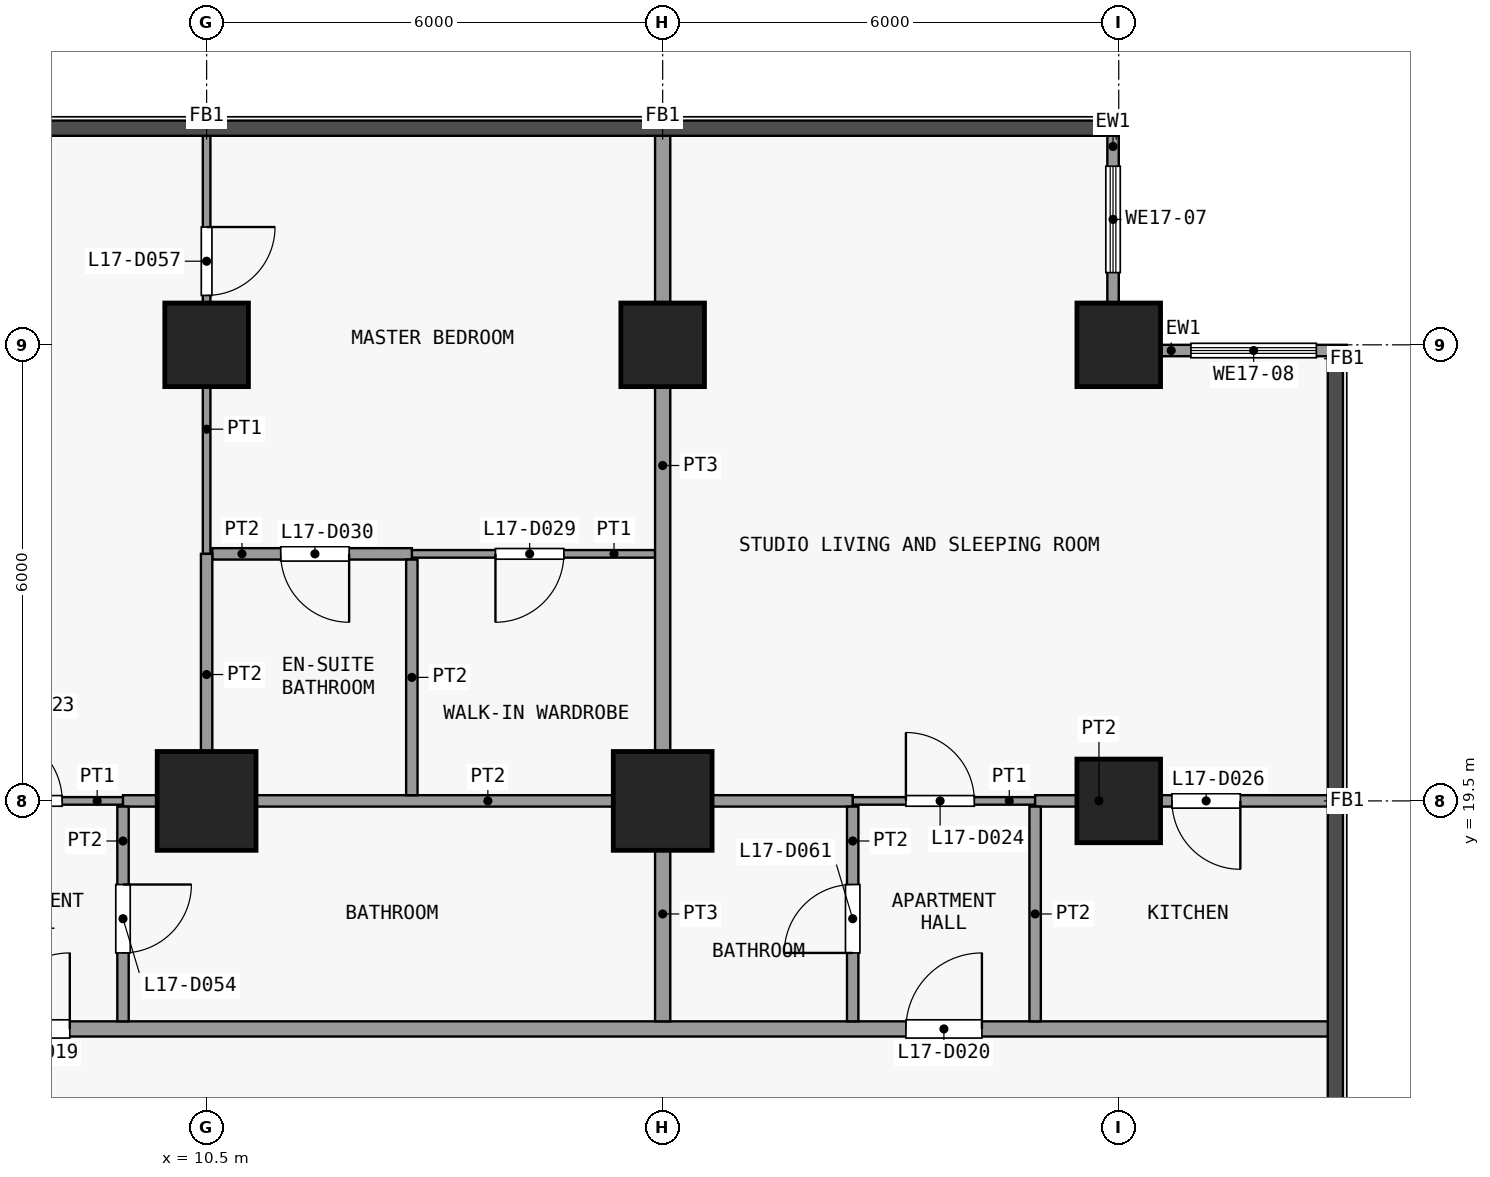
"""IFC4 building model, lengths in metres.
Left out: names, types, materials, properties, quantities, classifications, styles, units other than length and angle.
Written with IfcOpenShell. Run it as: python <this file> out.ifc"""

import sys

from ifc_helpers import new_model, si_unit, direction, frame, frame_2d, origin, origin_2d, place, context, subcontext, project, spatial, rectangle, extrude, element, fill, save


model = new_model("IFC4")
c1 = context("Model", 3, precision=1e-05, world=origin(), true_north=direction((0.0, 1.0)))
c2 = subcontext(c1, "Body", "Model", "MODEL_VIEW")
j1 = project(units=[si_unit("LENGTHUNIT", "METRE"), si_unit("PLANEANGLEUNIT", "RADIAN")], contexts=[c1])
p1 = place(None, origin())
s1 = spatial("IfcSite", under=j1, at=p1, CompositionType="ELEMENT")
p2 = place(p1, origin())
s2 = spatial("IfcBuilding", under=s1, at=p2, CompositionType="ELEMENT")
p3 = place(p2, frame((0.0, 0.0, 72.1)))
s3 = spatial("IfcBuildingStorey", under=s2, at=p3, CompositionType="ELEMENT", Elevation=72.1)
p4 = place(p3, frame((10.5, 19.5, 0.0), z_axis=(0.0, 0.0, 1.0), x_axis=(1.0, 0.0, 0.0)))
e1 = element("IfcColumn", 1, at=p4, inside=s3, PredefinedType="COLUMN", context=c2, shape_type="SweptSolid", body=[
    extrude(rectangle(XDim=1.3, YDim=1.3, at=origin_2d()), origin(), (0.0, 0.0, 1.0), 3.6),
])
p5 = place(p3, frame((10.5, 25.5, 0.0), z_axis=(0.0, 0.0, 1.0), x_axis=(1.0, 0.0, 0.0)))
e2 = element("IfcColumn", 2, at=p5, inside=s3, PredefinedType="COLUMN", context=c2, shape_type="SweptSolid", body=[
    extrude(rectangle(XDim=1.1, YDim=1.1, at=origin_2d()), origin(), (0.0, 0.0, 1.0), 3.6),
])
p6 = place(p3, frame((16.5, 19.5, 0.0), z_axis=(0.0, 0.0, 1.0), x_axis=(1.0, 0.0, 0.0)))
e3 = element("IfcColumn", 3, at=p6, inside=s3, PredefinedType="COLUMN", context=c2, shape_type="SweptSolid", body=[
    extrude(rectangle(XDim=1.3, YDim=1.3, at=origin_2d()), origin(), (0.0, 0.0, 1.0), 3.6),
])
for number, where, z_axis, x_axis in (
    (4, (16.5, 25.5, 0.0), (0.0, 0.0, 1.0), (1.0, 0.0, 0.0)),
    (5, (22.5, 19.5, 0.0), (0.0, 0.0, 1.0), (1.0, 0.0, 0.0)),
    (6, (22.5, 25.5, 0.0), (0.0, 0.0, 1.0), (1.0, 0.0, 0.0)),
):
    element("IfcColumn", number, at=place(p3, frame(where, z_axis=z_axis, x_axis=x_axis)), inside=s3, PredefinedType="COLUMN", context=c2, shape_type="SweptSolid", body=[
        extrude(rectangle(XDim=1.1, YDim=1.1, at=origin_2d()), origin(), (0.0, 0.0, 1.0), 3.6),
    ])
p7 = place(p3, frame((22.425, 28.25, 0.0), z_axis=(0.0, 0.0, 1.0), x_axis=(0.0, -1.0, 0.0)))
e7 = element("IfcWall", 7, at=p7, inside=s3, PredefinedType="SOLIDWALL", context=c2, shape_type="SweptSolid", body=[
    extrude(rectangle(XDim=2.2, YDim=0.15, at=frame_2d((1.1, 0.0))), origin(), (0.0, 0.0, 1.0), 3.15),
])
p8 = place(p7, frame((0.4, 0.0, 0.9)))
e8 = element("IfcOpeningElement", 8, at=p8, cuts=e7, PredefinedType="OPENING", context=c2, shape_type="SweptSolid", body=[
    extrude(rectangle(XDim=1.4, YDim=2.4, at=frame_2d((0.7, 1.2))), frame((0.0, 0.085, 0.0), z_axis=(0.0, -1.0, 0.0), x_axis=(1.0, 0.0, 0.0)), (0.0, 0.0, 1.0), 0.17),
])
p9 = place(p3, frame((23.05, 25.425, 0.0), z_axis=(0.0, 0.0, 1.0), x_axis=(1.0, 0.0, 0.0)))
e9 = element("IfcWall", 9, at=p9, inside=s3, PredefinedType="SOLIDWALL", context=c2, shape_type="SweptSolid", body=[
    extrude(rectangle(XDim=2.45, YDim=0.15, at=frame_2d((1.225, 0.0))), origin(), (0.0, 0.0, 1.0), 3.15),
])
p10 = place(p9, frame((0.4, 0.0, 0.9)))
e10 = element("IfcOpeningElement", 10, at=p10, cuts=e9, PredefinedType="OPENING", context=c2, shape_type="SweptSolid", body=[
    extrude(rectangle(XDim=1.65, YDim=2.4, at=frame_2d((0.825, 1.2))), frame((0.0, 0.085, 0.0), z_axis=(0.0, -1.0, 0.0), x_axis=(1.0, 0.0, 0.0)), (0.0, 0.0, 1.0), 0.17),
])
p11 = place(p3, frame((-25.35, 16.5, 0.0), z_axis=(0.0, 0.0, 1.0), x_axis=(1.0, 0.0, 0.0)))
e11 = element("IfcWall", 11, at=p11, inside=s3, PredefinedType="PARTITIONING", context=c2, shape_type="SweptSolid", body=[
    extrude(rectangle(XDim=50.7, YDim=0.2, at=frame_2d((25.35, 0.0))), origin(), (0.0, 0.0, 1.0), 3.15),
])
p12 = place(p11, frame((4.55, 0.0, 0.0)))
e12 = element("IfcOpeningElement", 12, at=p12, cuts=e11, PredefinedType="OPENING", context=c2, shape_type="SweptSolid", body=[
    extrude(rectangle(XDim=1.0, YDim=2.1, at=frame_2d((0.5, 1.05))), frame((0.0, 0.11, 0.0), z_axis=(0.0, -1.0, 0.0), x_axis=(1.0, 0.0, 0.0)), (0.0, 0.0, 1.0), 0.22),
])
p13 = place(p11, frame((19.05, 0.0, 0.0)))
e13 = element("IfcOpeningElement", 13, at=p13, cuts=e11, PredefinedType="OPENING", context=c2, shape_type="SweptSolid", body=[
    extrude(rectangle(XDim=1.0, YDim=2.1, at=frame_2d((0.5, 1.05))), frame((0.0, 0.11, 0.0), z_axis=(0.0, -1.0, 0.0), x_axis=(1.0, 0.0, 0.0)), (0.0, 0.0, 1.0), 0.22),
])
p14 = place(p11, frame((33.05, 0.0, 0.0)))
e14 = element("IfcOpeningElement", 14, at=p14, cuts=e11, PredefinedType="OPENING", context=c2, shape_type="SweptSolid", body=[
    extrude(rectangle(XDim=1.0, YDim=2.1, at=frame_2d((0.5, 1.05))), frame((0.0, 0.11, 0.0), z_axis=(0.0, -1.0, 0.0), x_axis=(1.0, 0.0, 0.0)), (0.0, 0.0, 1.0), 0.22),
])
p15 = place(p11, frame((45.05, 0.0, 0.0)))
e15 = element("IfcOpeningElement", 15, at=p15, cuts=e11, PredefinedType="OPENING", context=c2, shape_type="SweptSolid", body=[
    extrude(rectangle(XDim=1.0, YDim=2.1, at=frame_2d((0.5, 1.05))), frame((0.0, 0.11, 0.0), z_axis=(0.0, -1.0, 0.0), x_axis=(1.0, 0.0, 0.0)), (0.0, 0.0, 1.0), 0.22),
])
p16 = place(p3, frame((7.0, 19.5, 0.0), z_axis=(0.0, 0.0, 1.0), x_axis=(1.0, 0.0, 0.0)))
e16 = element("IfcWall", 16, at=p16, inside=s3, PredefinedType="PARTITIONING", context=c2, shape_type="SweptSolid", body=[
    extrude(rectangle(XDim=2.4, YDim=0.1, at=frame_2d((1.2, 0.0))), origin(), (0.0, 0.0, 1.0), 3.15),
])
p17 = place(p16, frame((0.7, 0.0, 0.0)))
e17 = element("IfcOpeningElement", 17, at=p17, cuts=e16, PredefinedType="OPENING", context=c2, shape_type="SweptSolid", body=[
    extrude(rectangle(XDim=0.9, YDim=2.1, at=frame_2d((0.45, 1.05))), frame((0.0, 0.06, 0.0), z_axis=(0.0, -1.0, 0.0), x_axis=(1.0, 0.0, 0.0)), (0.0, 0.0, 1.0), 0.12),
])
p18 = place(p3, frame((19.0, 19.5, 0.0), z_axis=(0.0, 0.0, 1.0), x_axis=(1.0, 0.0, 0.0)))
e18 = element("IfcWall", 18, at=p18, inside=s3, PredefinedType="PARTITIONING", context=c2, shape_type="SweptSolid", body=[
    extrude(rectangle(XDim=2.4, YDim=0.1, at=frame_2d((1.2, 0.0))), origin(), (0.0, 0.0, 1.0), 3.15),
])
p19 = place(p18, frame((0.7, 0.0, 0.0)))
e19 = element("IfcOpeningElement", 19, at=p19, cuts=e18, PredefinedType="OPENING", context=c2, shape_type="SweptSolid", body=[
    extrude(rectangle(XDim=0.9, YDim=2.1, at=frame_2d((0.45, 1.05))), frame((0.0, 0.06, 0.0), z_axis=(0.0, -1.0, 0.0), x_axis=(1.0, 0.0, 0.0)), (0.0, 0.0, 1.0), 0.12),
])
p20 = place(p3, frame((9.4, 19.5, 0.0), z_axis=(0.0, 0.0, 1.0), x_axis=(1.0, 0.0, 0.0)))
e20 = element("IfcWall", 20, at=p20, inside=s3, PredefinedType="PARTITIONING", context=c2, shape_type="SweptSolid", body=[
    extrude(rectangle(XDim=9.6, YDim=0.15, at=frame_2d((4.8, 0.0))), origin(), (0.0, 0.0, 1.0), 3.15),
])
p21 = place(p3, frame((21.4, 19.5, 0.0), z_axis=(0.0, 0.0, 1.0), x_axis=(1.0, 0.0, 0.0)))
e21 = element("IfcWall", 21, at=p21, inside=s3, PredefinedType="PARTITIONING", context=c2, shape_type="SweptSolid", body=[
    extrude(rectangle(XDim=3.85, YDim=0.15, at=frame_2d((1.925, 0.0))), origin(), (0.0, 0.0, 1.0), 3.15),
])
p22 = place(p21, frame((1.8, 0.0, 0.0)))
e22 = element("IfcOpeningElement", 22, at=p22, cuts=e21, PredefinedType="OPENING", context=c2, shape_type="SweptSolid", body=[
    extrude(rectangle(XDim=0.9, YDim=2.1, at=frame_2d((0.45, 1.05))), frame((0.0, 0.085, 0.0), z_axis=(0.0, -1.0, 0.0), x_axis=(1.0, 0.0, 0.0)), (0.0, 0.0, 1.0), 0.17),
])
p23 = place(p3, frame((13.2, 22.75, 0.0), z_axis=(0.0, 0.0, 1.0), x_axis=(1.0, 0.0, 0.0)))
e23 = element("IfcWall", 23, at=p23, inside=s3, PredefinedType="PARTITIONING", context=c2, shape_type="SweptSolid", body=[
    extrude(rectangle(XDim=3.2, YDim=0.1, at=frame_2d((1.6, 0.0))), origin(), (0.0, 0.0, 1.0), 3.15),
])
p24 = place(p23, frame((1.1, 0.0, 0.0)))
e24 = element("IfcOpeningElement", 24, at=p24, cuts=e23, PredefinedType="OPENING", context=c2, shape_type="SweptSolid", body=[
    extrude(rectangle(XDim=0.9, YDim=2.1, at=frame_2d((0.45, 1.05))), frame((0.0, 0.06, 0.0), z_axis=(0.0, -1.0, 0.0), x_axis=(1.0, 0.0, 0.0)), (0.0, 0.0, 1.0), 0.12),
])
p25 = place(p3, frame((10.575, 22.75, 0.0), z_axis=(0.0, 0.0, 1.0), x_axis=(1.0, 0.0, 0.0)))
e25 = element("IfcWall", 25, at=p25, inside=s3, PredefinedType="PARTITIONING", context=c2, shape_type="SweptSolid", body=[
    extrude(rectangle(XDim=2.625, YDim=0.15, at=frame_2d((1.312, 0.0))), origin(), (0.0, 0.0, 1.0), 3.15),
])
p26 = place(p25, frame((0.9, 0.0, 0.0)))
e26 = element("IfcOpeningElement", 26, at=p26, cuts=e25, PredefinedType="OPENING", context=c2, shape_type="SweptSolid", body=[
    extrude(rectangle(XDim=0.9, YDim=2.1, at=frame_2d((0.45, 1.05))), frame((0.0, 0.085, 0.0), z_axis=(0.0, -1.0, 0.0), x_axis=(1.0, 0.0, 0.0)), (0.0, 0.0, 1.0), 0.17),
])
p27 = place(p3, frame((9.4, 16.6, 0.0), z_axis=(0.0, 0.0, 1.0), x_axis=(0.0, 1.0, 0.0)))
e27 = element("IfcWall", 27, at=p27, inside=s3, PredefinedType="PARTITIONING", context=c2, shape_type="SweptSolid", body=[
    extrude(rectangle(XDim=2.825, YDim=0.15, at=frame_2d((1.413, 0.0))), origin(), (0.0, 0.0, 1.0), 3.15),
])
p28 = place(p27, frame((0.9, 0.0, 0.0)))
e28 = element("IfcOpeningElement", 28, at=p28, cuts=e27, PredefinedType="OPENING", context=c2, shape_type="SweptSolid", body=[
    extrude(rectangle(XDim=0.9, YDim=2.1, at=frame_2d((0.45, 1.05))), frame((0.0, 0.085, 0.0), z_axis=(0.0, -1.0, 0.0), x_axis=(1.0, 0.0, 0.0)), (0.0, 0.0, 1.0), 0.17),
])
p29 = place(p3, frame((10.5, 22.75, 0.0), z_axis=(0.0, 0.0, 1.0), x_axis=(0.0, 1.0, 0.0)))
e29 = element("IfcWall", 29, at=p29, inside=s3, PredefinedType="PARTITIONING", context=c2, shape_type="SweptSolid", body=[
    extrude(rectangle(XDim=5.5, YDim=0.1, at=frame_2d((2.75, 0.0))), origin(), (0.0, 0.0, 1.0), 3.15),
])
p30 = place(p29, frame((3.4, 0.0, 0.0)))
e30 = element("IfcOpeningElement", 30, at=p30, cuts=e29, PredefinedType="OPENING", context=c2, shape_type="SweptSolid", body=[
    extrude(rectangle(XDim=0.9, YDim=2.1, at=frame_2d((0.45, 1.05))), frame((0.0, 0.06, 0.0), z_axis=(0.0, -1.0, 0.0), x_axis=(1.0, 0.0, 0.0)), (0.0, 0.0, 1.0), 0.12),
])
p31 = place(p3, frame((10.5, 19.575, 0.0), z_axis=(0.0, 0.0, 1.0), x_axis=(0.0, 1.0, 0.0)))
e31 = element("IfcWall", 31, at=p31, inside=s3, PredefinedType="PARTITIONING", context=c2, shape_type="SweptSolid", body=[
    extrude(rectangle(XDim=3.175, YDim=0.15, at=frame_2d((1.587, 0.0))), origin(), (0.0, 0.0, 1.0), 3.15),
])
p32 = place(p3, frame((13.2, 19.575, 0.0), z_axis=(0.0, 0.0, 1.0), x_axis=(0.0, 1.0, 0.0)))
e32 = element("IfcWall", 32, at=p32, inside=s3, PredefinedType="PARTITIONING", context=c2, shape_type="SweptSolid", body=[
    extrude(rectangle(XDim=3.1, YDim=0.15, at=frame_2d((1.55, 0.0))), origin(), (0.0, 0.0, 1.0), 3.15),
])
p33 = place(p3, frame((16.5, 16.6, 0.0), z_axis=(0.0, 0.0, 1.0), x_axis=(0.0, 1.0, 0.0)))
e33 = element("IfcWall", 33, at=p33, inside=s3, PredefinedType="PARTITIONING", context=c2, shape_type="SweptSolid", body=[
    extrude(rectangle(XDim=2.825, YDim=0.2, at=frame_2d((1.413, 0.0))), origin(), (0.0, 0.0, 1.0), 3.15),
])
p34 = place(p3, frame((16.5, 19.575, 0.0), z_axis=(0.0, 0.0, 1.0), x_axis=(0.0, 1.0, 0.0)))
e34 = element("IfcWall", 34, at=p34, inside=s3, PredefinedType="PARTITIONING", context=c2, shape_type="SweptSolid", body=[
    extrude(rectangle(XDim=8.675, YDim=0.2, at=frame_2d((4.337, 0.0))), origin(), (0.0, 0.0, 1.0), 3.15),
])
p35 = place(p3, frame((19.0, 16.6, 0.0), z_axis=(0.0, 0.0, 1.0), x_axis=(0.0, 1.0, 0.0)))
e35 = element("IfcWall", 35, at=p35, inside=s3, PredefinedType="PARTITIONING", context=c2, shape_type="SweptSolid", body=[
    extrude(rectangle(XDim=2.825, YDim=0.15, at=frame_2d((1.413, 0.0))), origin(), (0.0, 0.0, 1.0), 3.15),
])
p36 = place(p35, frame((0.9, 0.0, 0.0)))
e36 = element("IfcOpeningElement", 36, at=p36, cuts=e35, PredefinedType="OPENING", context=c2, shape_type="SweptSolid", body=[
    extrude(rectangle(XDim=0.9, YDim=2.1, at=frame_2d((0.45, 1.05))), frame((0.0, 0.085, 0.0), z_axis=(0.0, -1.0, 0.0), x_axis=(1.0, 0.0, 0.0)), (0.0, 0.0, 1.0), 0.17),
])
p37 = place(p3, frame((21.4, 16.6, 0.0), z_axis=(0.0, 0.0, 1.0), x_axis=(0.0, 1.0, 0.0)))
e37 = element("IfcWall", 37, at=p37, inside=s3, PredefinedType="PARTITIONING", context=c2, shape_type="SweptSolid", body=[
    extrude(rectangle(XDim=2.825, YDim=0.15, at=frame_2d((1.413, 0.0))), origin(), (0.0, 0.0, 1.0), 3.15),
])
p38 = place(p8, origin())
e38 = element("IfcWindow", 38, at=p38, inside=s3, PartitioningType="SINGLE_PANEL", PredefinedType="WINDOW", context=c2, shape_type="SweptSolid", body=[
    extrude(rectangle(XDim=1.4, YDim=2.4, at=frame_2d((0.7, 1.2))), frame((0.0, 0.03, 0.0), z_axis=(0.0, -1.0, 0.0), x_axis=(1.0, 0.0, 0.0)), (0.0, 0.0, 1.0), 0.06),
])
fill(e8, e38)
p39 = place(p10, origin())
e39 = element("IfcWindow", 39, at=p39, inside=s3, PartitioningType="SINGLE_PANEL", PredefinedType="WINDOW", context=c2, shape_type="SweptSolid", body=[
    extrude(rectangle(XDim=1.65, YDim=2.4, at=frame_2d((0.825, 1.2))), frame((0.0, 0.03, 0.0), z_axis=(0.0, -1.0, 0.0), x_axis=(1.0, 0.0, 0.0)), (0.0, 0.0, 1.0), 0.06),
])
fill(e10, e39)
p40 = place(p14, origin())
e40 = element("IfcDoor", 40, at=p40, inside=s3, OperationType="SINGLE_SWING_LEFT", PredefinedType="DOOR", context=c2, shape_type="SweptSolid", body=[
    extrude(rectangle(XDim=1.0, YDim=2.1, at=frame_2d((0.5, 1.05))), frame((0.0, 0.025, 0.0), z_axis=(0.0, -1.0, 0.0), x_axis=(1.0, 0.0, 0.0)), (0.0, 0.0, 1.0), 0.05),
])
fill(e14, e40)
p41 = place(p15, origin())
e41 = element("IfcDoor", 41, at=p41, inside=s3, OperationType="SINGLE_SWING_LEFT", PredefinedType="DOOR", context=c2, shape_type="SweptSolid", body=[
    extrude(rectangle(XDim=1.0, YDim=2.1, at=frame_2d((0.5, 1.05))), frame((0.0, 0.025, 0.0), z_axis=(0.0, -1.0, 0.0), x_axis=(1.0, 0.0, 0.0)), (0.0, 0.0, 1.0), 0.05),
])
fill(e15, e41)
p42 = place(p17, origin())
e42 = element("IfcDoor", 42, at=p42, inside=s3, OperationType="SINGLE_SWING_RIGHT", PredefinedType="DOOR", context=c2, shape_type="SweptSolid", body=[
    extrude(rectangle(XDim=0.9, YDim=2.1, at=frame_2d((0.45, 1.05))), frame((0.0, 0.025, 0.0), z_axis=(0.0, -1.0, 0.0), x_axis=(1.0, 0.0, 0.0)), (0.0, 0.0, 1.0), 0.05),
])
fill(e17, e42)
p43 = place(p19, origin())
e43 = element("IfcDoor", 43, at=p43, inside=s3, OperationType="SINGLE_SWING_RIGHT", PredefinedType="DOOR", context=c2, shape_type="SweptSolid", body=[
    extrude(rectangle(XDim=0.9, YDim=2.1, at=frame_2d((0.45, 1.05))), frame((0.0, 0.025, 0.0), z_axis=(0.0, -1.0, 0.0), x_axis=(1.0, 0.0, 0.0)), (0.0, 0.0, 1.0), 0.05),
])
fill(e19, e43)
p44 = place(p22, origin())
e44 = element("IfcDoor", 44, at=p44, inside=s3, OperationType="SINGLE_SWING_RIGHT", PredefinedType="DOOR", context=c2, shape_type="SweptSolid", body=[
    extrude(rectangle(XDim=0.9, YDim=2.1, at=frame_2d((0.45, 1.05))), frame((0.0, 0.025, 0.0), z_axis=(0.0, -1.0, 0.0), x_axis=(1.0, 0.0, 0.0)), (0.0, 0.0, 1.0), 0.05),
])
fill(e22, e44)
p45 = place(p24, origin())
e45 = element("IfcDoor", 45, at=p45, inside=s3, OperationType="SINGLE_SWING_LEFT", PredefinedType="DOOR", context=c2, shape_type="SweptSolid", body=[
    extrude(rectangle(XDim=0.9, YDim=2.1, at=frame_2d((0.45, 1.05))), frame((0.0, 0.025, 0.0), z_axis=(0.0, -1.0, 0.0), x_axis=(1.0, 0.0, 0.0)), (0.0, 0.0, 1.0), 0.05),
])
fill(e24, e45)
p46 = place(p26, origin())
e46 = element("IfcDoor", 46, at=p46, inside=s3, OperationType="SINGLE_SWING_RIGHT", PredefinedType="DOOR", context=c2, shape_type="SweptSolid", body=[
    extrude(rectangle(XDim=0.9, YDim=2.1, at=frame_2d((0.45, 1.05))), frame((0.0, 0.025, 0.0), z_axis=(0.0, -1.0, 0.0), x_axis=(1.0, 0.0, 0.0)), (0.0, 0.0, 1.0), 0.05),
])
fill(e26, e46)
p47 = place(p28, origin())
e47 = element("IfcDoor", 47, at=p47, inside=s3, OperationType="SINGLE_SWING_RIGHT", PredefinedType="DOOR", context=c2, shape_type="SweptSolid", body=[
    extrude(rectangle(XDim=0.9, YDim=2.1, at=frame_2d((0.45, 1.05))), frame((0.0, 0.025, 0.0), z_axis=(0.0, -1.0, 0.0), x_axis=(1.0, 0.0, 0.0)), (0.0, 0.0, 1.0), 0.05),
])
fill(e28, e47)
p48 = place(p30, origin())
e48 = element("IfcDoor", 48, at=p48, inside=s3, OperationType="SINGLE_SWING_RIGHT", PredefinedType="DOOR", context=c2, shape_type="SweptSolid", body=[
    extrude(rectangle(XDim=0.9, YDim=2.1, at=frame_2d((0.45, 1.05))), frame((0.0, 0.025, 0.0), z_axis=(0.0, -1.0, 0.0), x_axis=(1.0, 0.0, 0.0)), (0.0, 0.0, 1.0), 0.05),
])
fill(e30, e48)
p49 = place(p36, origin())
e49 = element("IfcDoor", 49, at=p49, inside=s3, OperationType="SINGLE_SWING_RIGHT", PredefinedType="DOOR", context=c2, shape_type="SweptSolid", body=[
    extrude(rectangle(XDim=0.9, YDim=2.1, at=frame_2d((0.45, 1.05))), frame((0.0, 0.025, 0.0), z_axis=(0.0, -1.0, 0.0), x_axis=(1.0, 0.0, 0.0)), (0.0, 0.0, 1.0), 0.05),
])
fill(e36, e49)
save(model, sys.argv[1])
